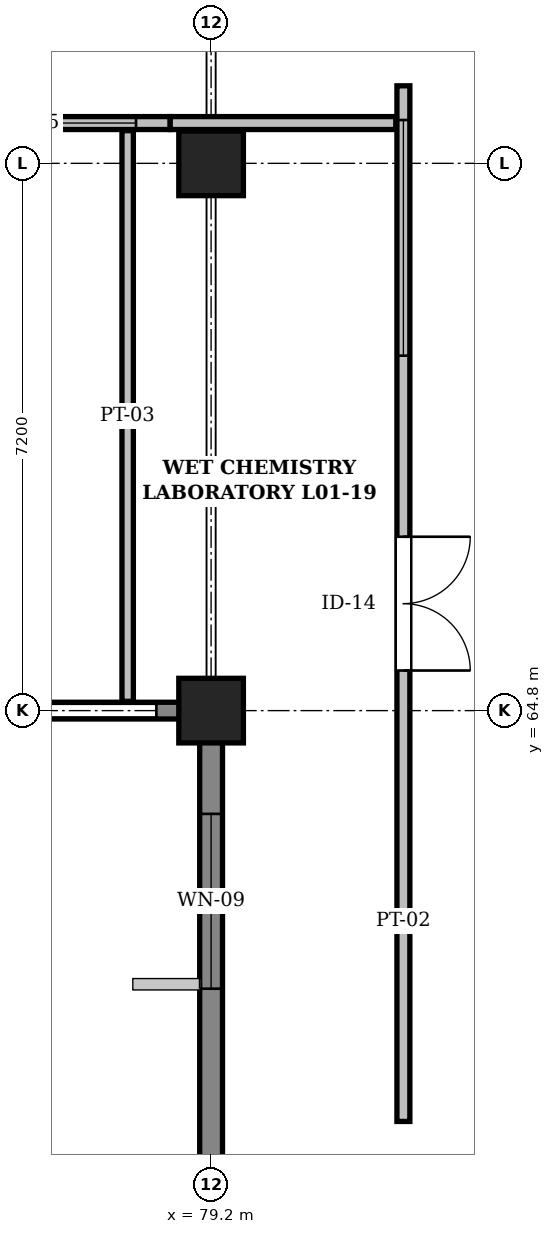
"""IFC4 building model, lengths in metres.
Left out: names, types, materials, properties, quantities, classifications, styles, units other than length and angle.
Written with IfcOpenShell. Run it as: python <this file> out.ifc"""

import sys

from ifc_helpers import new_model, si_unit, direction, frame, frame_2d, origin, origin_2d, place, context, subcontext, project, spatial, rectangle, extrude, element, fill, save


model = new_model("IFC4")
c1 = context("Model", 3, precision=1e-05, world=origin(), true_north=direction((0.0, 1.0)))
c2 = subcontext(c1, "Body", "Model", "MODEL_VIEW")
j1 = project(units=[si_unit("LENGTHUNIT", "METRE"), si_unit("PLANEANGLEUNIT", "RADIAN")], contexts=[c1])
p1 = place(None, origin())
s1 = spatial("IfcSite", under=j1, at=p1, CompositionType="ELEMENT")
p2 = place(p1, origin())
s2 = spatial("IfcBuilding", under=s1, at=p2, CompositionType="ELEMENT")
p3 = place(p2, frame((0.0, 0.0, 4.8)))
s3 = spatial("IfcBuildingStorey", under=s2, at=p3, CompositionType="ELEMENT", Elevation=4.8)
for number, where, z_axis, x_axis in (
    (1, (79.2, 64.8, 0.0), (0.0, 0.0, 1.0), (1.0, 0.0, 0.0)),
    (2, (79.2, 72.0, 0.0), (0.0, 0.0, 1.0), (1.0, 0.0, 0.0)),
):
    element("IfcColumn", number, at=place(p3, frame(where, z_axis=z_axis, x_axis=x_axis)), inside=s3, PredefinedType="COLUMN", context=c2, shape_type="SweptSolid", body=[
        extrude(rectangle(XDim=0.85, YDim=0.85, at=origin_2d()), origin(), (0.0, 0.0, 1.0), 4.8),
    ])
p4 = place(p3, frame((79.2, 57.6, 0.0), z_axis=(0.0, 0.0, 1.0), x_axis=(0.0, 1.0, 0.0)))
e3 = element("IfcWall", 3, at=p4, inside=s3, PredefinedType="SOLIDWALL", context=c2, shape_type="SweptSolid", body=[
    extrude(rectangle(XDim=7.048, YDim=0.3, at=frame_2d((3.524, 0.0))), origin(), (0.0, 0.0, 1.0), 4.52),
])
p5 = place(p4, frame((3.542, 0.0, 0.95)))
e4 = element("IfcOpeningElement", 4, at=p5, cuts=e3, PredefinedType="OPENING", context=c2, shape_type="SweptSolid", body=[
    extrude(rectangle(XDim=2.3, YDim=1.3, at=frame_2d((1.15, 0.65))), frame((0.0, 0.162, 0.0), z_axis=(0.0, -1.0, 0.0), x_axis=(1.0, 0.0, 0.0)), (0.0, 0.0, 1.0), 0.324),
])
p6 = place(p3, frame((79.35, 64.8, 0.0), z_axis=(0.0, 0.0, 1.0), x_axis=(-1.0, 0.0, 0.0)))
e5 = element("IfcWall", 5, at=p6, inside=s3, PredefinedType="SOLIDWALL", context=c2, shape_type="SweptSolid", body=[
    extrude(rectangle(XDim=7.35, YDim=0.22, at=frame_2d((3.675, 0.0))), origin(), (0.0, 0.0, 1.0), 1.24),
])
p7 = place(p3, frame((81.73, 59.395, 0.0), z_axis=(0.0, 0.0, 1.0), x_axis=(0.0, 1.0, 0.0)))
e6 = element("IfcWall", 6, at=p7, inside=s3, PredefinedType="PARTITIONING", context=c2, shape_type="SweptSolid", body=[
    extrude(rectangle(XDim=13.625, YDim=0.17, at=frame_2d((6.812, 0.0))), origin(), (0.0, 0.0, 1.0), 4.46),
])
p8 = place(p7, frame((5.933, 0.0, 0.0)))
e7 = element("IfcOpeningElement", 7, at=p8, cuts=e6, PredefinedType="OPENING", context=c2, shape_type="SweptSolid", body=[
    extrude(rectangle(XDim=1.76, YDim=2.3, at=frame_2d((0.88, 1.15))), frame((0.0, 0.097, 0.0), z_axis=(0.0, -1.0, 0.0), x_axis=(1.0, 0.0, 0.0)), (0.0, 0.0, 1.0), 0.194),
])
p9 = place(p7, frame((10.075, 0.0, 1.05)))
e8 = element("IfcOpeningElement", 8, at=p9, cuts=e6, PredefinedType="OPENING", context=c2, shape_type="SweptSolid", body=[
    extrude(rectangle(XDim=3.1, YDim=1.15, at=frame_2d((1.55, 0.575))), frame((0.0, 0.097, 0.0), z_axis=(0.0, -1.0, 0.0), x_axis=(1.0, 0.0, 0.0)), (0.0, 0.0, 1.0), 0.194),
])
p10 = place(p3, frame((61.098, 72.53, 0.0), z_axis=(0.0, 0.0, 1.0), x_axis=(1.0, 0.0, 0.0)))
e9 = element("IfcWall", 9, at=p10, inside=s3, PredefinedType="PARTITIONING", context=c2, shape_type="SweptSolid", body=[
    extrude(rectangle(XDim=17.564, YDim=0.17, at=frame_2d((8.782, 0.0))), origin(), (0.0, 0.0, 1.0), 4.46),
])
p11 = place(p10, frame((7.142, 0.0, 0.0)))
e10 = element("IfcOpeningElement", 10, at=p11, cuts=e9, PredefinedType="OPENING", context=c2, shape_type="SweptSolid", body=[
    extrude(rectangle(XDim=1.68, YDim=2.28, at=frame_2d((0.84, 1.14))), frame((0.0, 0.097, 0.0), z_axis=(0.0, -1.0, 0.0), x_axis=(1.0, 0.0, 0.0)), (0.0, 0.0, 1.0), 0.194),
])
p12 = place(p10, frame((14.364, 0.0, 1.05)))
e11 = element("IfcOpeningElement", 11, at=p12, cuts=e9, PredefinedType="OPENING", context=c2, shape_type="SweptSolid", body=[
    extrude(rectangle(XDim=2.75, YDim=1.15, at=frame_2d((1.375, 0.575))), frame((0.0, 0.097, 0.0), z_axis=(0.0, -1.0, 0.0), x_axis=(1.0, 0.0, 0.0)), (0.0, 0.0, 1.0), 0.194),
])
p13 = place(p3, frame((78.662, 72.53, 0.0), z_axis=(0.0, 0.0, 1.0), x_axis=(1.0, 0.0, 0.0)))
e12 = element("IfcWall", 12, at=p13, inside=s3, PredefinedType="PARTITIONING", context=c2, shape_type="SweptSolid", body=[
    extrude(rectangle(XDim=2.968, YDim=0.17, at=frame_2d((1.484, 0.0))), origin(), (0.0, 0.0, 1.0), 4.46),
])
p14 = place(p3, frame((78.102, 64.922, 0.0), z_axis=(0.0, 0.0, 1.0), x_axis=(0.0, 1.0, 0.0)))
e13 = element("IfcWall", 13, at=p14, inside=s3, PredefinedType="PARTITIONING", context=c2, shape_type="SweptSolid", body=[
    extrude(rectangle(XDim=7.508, YDim=0.15, at=frame_2d((3.754, 0.0))), origin(), (0.0, 0.0, 1.0), 4.46),
])
p15 = place(p5, origin())
e14 = element("IfcWindow", 14, at=p15, inside=s3, PartitioningType="SINGLE_PANEL", PredefinedType="WINDOW", context=c2, shape_type="SweptSolid", body=[
    extrude(rectangle(XDim=2.3, YDim=1.3, at=frame_2d((1.15, 0.65))), frame((0.0, 0.03, 0.0), z_axis=(0.0, -1.0, 0.0), x_axis=(1.0, 0.0, 0.0)), (0.0, 0.0, 1.0), 0.06),
])
fill(e4, e14)
p16 = place(p12, origin())
e15 = element("IfcWindow", 15, at=p16, inside=s3, PartitioningType="SINGLE_PANEL", PredefinedType="WINDOW", context=c2, shape_type="SweptSolid", body=[
    extrude(rectangle(XDim=2.75, YDim=1.15, at=frame_2d((1.375, 0.575))), frame((0.0, 0.03, 0.0), z_axis=(0.0, -1.0, 0.0), x_axis=(1.0, 0.0, 0.0)), (0.0, 0.0, 1.0), 0.06),
])
fill(e11, e15)
p17 = place(p8, frame((1.76, 0.0, 0.0), z_axis=(0.0, 0.0, 1.0), x_axis=(-1.0, 0.0, 0.0)))
e16 = element("IfcDoor", 16, at=p17, inside=s3, OperationType="DOUBLE_DOOR_SINGLE_SWING", PredefinedType="DOOR", context=c2, shape_type="SweptSolid", body=[
    extrude(rectangle(XDim=1.76, YDim=2.3, at=frame_2d((0.88, 1.15))), frame((0.0, 0.025, 0.0), z_axis=(0.0, -1.0, 0.0), x_axis=(1.0, 0.0, 0.0)), (0.0, 0.0, 1.0), 0.05),
])
fill(e7, e16)
p18 = place(p9, origin())
e17 = element("IfcWindow", 17, at=p18, inside=s3, PartitioningType="SINGLE_PANEL", PredefinedType="WINDOW", context=c2, shape_type="SweptSolid", body=[
    extrude(rectangle(XDim=3.1, YDim=1.15, at=frame_2d((1.55, 0.575))), frame((0.0, 0.03, 0.0), z_axis=(0.0, -1.0, 0.0), x_axis=(1.0, 0.0, 0.0)), (0.0, 0.0, 1.0), 0.06),
])
fill(e8, e17)
save(model, sys.argv[1])
